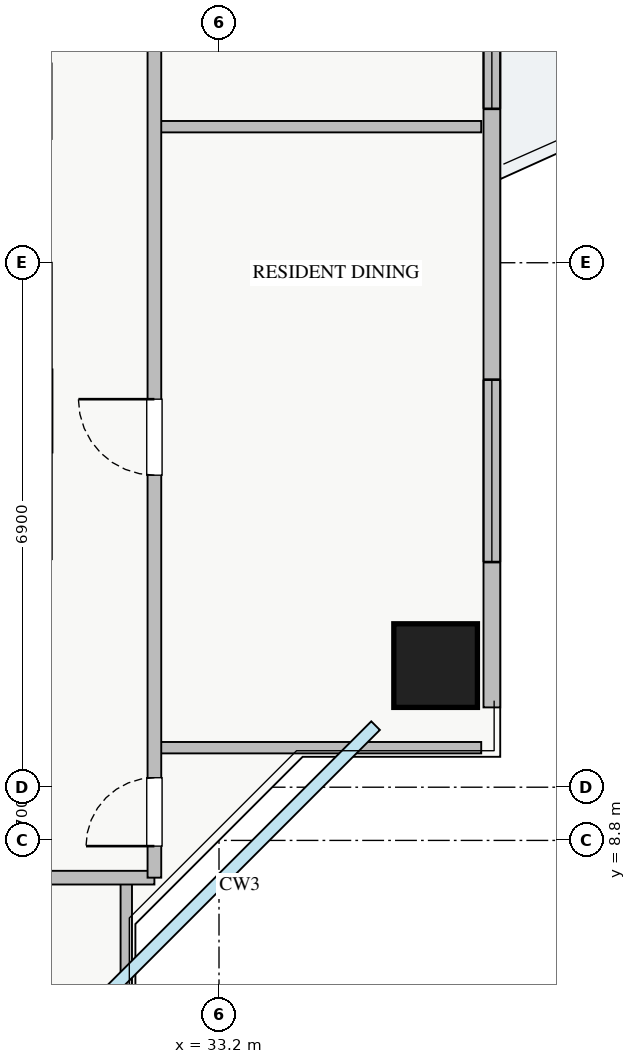
"""IFC4 building model, lengths in metres.
Left out: names, types, materials, properties, quantities, classifications, styles, units other than length and angle.
Written with IfcOpenShell. Run it as: python <this file> out.ifc"""

import sys

from ifc_helpers import new_model, si_unit, direction, frame, frame_2d, origin, origin_2d, place, context, subcontext, project, spatial, rectangle, extrude, source, transform, mapped, element, fill, save


model = new_model("IFC4")
c1 = context("Model", 3, precision=1e-05, world=origin(), true_north=direction((0.0, 1.0)))
c2 = subcontext(c1, "Body", "Model", "MODEL_VIEW")
j1 = project(units=[si_unit("LENGTHUNIT", "METRE"), si_unit("PLANEANGLEUNIT", "RADIAN")], contexts=[c1])
p1 = place(None, origin())
s1 = spatial("IfcSite", under=j1, at=p1, CompositionType="ELEMENT")
p2 = place(p1, origin())
s2 = spatial("IfcBuilding", under=s1, at=p2, CompositionType="ELEMENT")
p3 = place(p2, frame((0.0, 0.0, 129.5)))
s3 = spatial("IfcBuildingStorey", under=s2, at=p3, CompositionType="ELEMENT", Elevation=129.5)
m1 = source(origin(), c2, "Body", "SweptSolid", [
    extrude(rectangle(XDim=1.1, YDim=1.1, at=origin_2d()), origin(), (0.0, 0.0, 1.0), 3.25),
])
p4 = place(p3, frame((36.05, 11.1, 0.0), z_axis=(0.0, 0.0, 1.0), x_axis=(1.0, 0.0, 0.0)))
e1 = element("IfcColumn", 1, at=p4, inside=s3, PredefinedType="COLUMN", context=c2, shape_type="MappedRepresentation", body=[
    mapped(m1, transform((0.0, 0.0, 0.0), x_axis=(1.0, 0.0, 0.0), y_axis=(0.0, 1.0, 0.0), z_axis=(0.0, 0.0, 1.0), scale=1.0)),
])
p5 = place(p3, frame((36.79, 10.55, 0.0), z_axis=(0.0, 0.0, 1.0), x_axis=(0.0, 1.0, 0.0)))
e2 = element("IfcWall", 2, at=p5, inside=s3, PredefinedType="STANDARD", context=c2, shape_type="SweptSolid", body=[
    extrude(rectangle(XDim=24.9, YDim=0.22, at=frame_2d((12.45, 0.0))), origin(), (0.0, 0.0, 1.0), 2.61),
])
p6 = place(p5, frame((13.3, 0.0, 0.0)))
e3 = element("IfcOpeningElement", 3, at=p6, cuts=e2, PredefinedType="OPENING", context=c2, shape_type="SweptSolid", body=[
    extrude(rectangle(XDim=1.2, YDim=2.1, at=frame_2d((0.6, 1.05))), frame((0.0, 0.12, 0.0), z_axis=(0.0, -1.0, 0.0), x_axis=(1.0, 0.0, 0.0)), (0.0, 0.0, 1.0), 0.24),
])
p7 = place(p5, frame((1.912, 0.0, 0.9)))
e4 = element("IfcOpeningElement", 4, at=p7, cuts=e2, PredefinedType="OPENING", context=c2, shape_type="SweptSolid", body=[
    extrude(rectangle(XDim=2.4, YDim=1.48, at=frame_2d((1.2, 0.74))), frame((0.0, 0.12, 0.0), z_axis=(0.0, -1.0, 0.0), x_axis=(1.0, 0.0, 0.0)), (0.0, 0.0, 1.0), 0.24),
])
p8 = place(p5, frame((22.165, 0.0, 0.9)))
e5 = element("IfcOpeningElement", 5, at=p8, cuts=e2, PredefinedType="OPENING", context=c2, shape_type="SweptSolid", body=[
    extrude(rectangle(XDim=2.1, YDim=1.5, at=frame_2d((1.05, 0.75))), frame((0.0, 0.12, 0.0), z_axis=(0.0, -1.0, 0.0), x_axis=(1.0, 0.0, 0.0)), (0.0, 0.0, 1.0), 0.24),
])
p9 = place(p5, frame((18.093, 0.0, 0.9)))
e6 = element("IfcOpeningElement", 6, at=p9, cuts=e2, PredefinedType="OPENING", context=c2, shape_type="SweptSolid", body=[
    extrude(rectangle(XDim=2.4, YDim=1.5, at=frame_2d((1.2, 0.75))), frame((0.0, 0.12, 0.0), z_axis=(0.0, -1.0, 0.0), x_axis=(1.0, 0.0, 0.0)), (0.0, 0.0, 1.0), 0.24),
])
p10 = place(p5, frame((7.875, 0.0, 0.9)))
e7 = element("IfcOpeningElement", 7, at=p10, cuts=e2, PredefinedType="OPENING", context=c2, shape_type="SweptSolid", body=[
    extrude(rectangle(XDim=0.9, YDim=1.2, at=frame_2d((0.45, 0.6))), frame((0.0, 0.12, 0.0), z_axis=(0.0, -1.0, 0.0), x_axis=(1.0, 0.0, 0.0)), (0.0, 0.0, 1.0), 0.24),
])
p11 = place(p3, frame((31.98, 5.35, 0.0), z_axis=(0.0, 0.0, 1.0), x_axis=(0.0, 1.0, 0.0)))
e8 = element("IfcWall", 8, at=p11, inside=s3, PredefinedType="PARTITIONING", context=c2, shape_type="SweptSolid", body=[
    extrude(rectangle(XDim=2.96, YDim=0.15, at=frame_2d((1.48, 0.0))), origin(), (0.0, 0.0, 1.0), 3.07),
])
p12 = place(p3, frame((8.72, 8.31, 0.0), z_axis=(0.0, 0.0, 1.0), x_axis=(1.0, 0.0, 0.0)))
e9 = element("IfcWall", 9, at=p12, inside=s3, PredefinedType="PARTITIONING", context=c2, shape_type="SweptSolid", body=[
    extrude(rectangle(XDim=23.63, YDim=0.18, at=frame_2d((11.815, 0.0))), origin(), (0.0, 0.0, 1.0), 3.07),
])
p13 = place(p12, frame((4.69, 0.0, 0.0)))
e10 = element("IfcOpeningElement", 10, at=p13, cuts=e9, PredefinedType="OPENING", context=c2, shape_type="SweptSolid", body=[
    extrude(rectangle(XDim=1.0, YDim=2.05, at=frame_2d((0.5, 1.025))), frame((0.0, 0.1, 0.0), z_axis=(0.0, -1.0, 0.0), x_axis=(1.0, 0.0, 0.0)), (0.0, 0.0, 1.0), 0.2),
])
p14 = place(p12, frame((16.32, 0.0, 0.0)))
e11 = element("IfcOpeningElement", 11, at=p14, cuts=e9, PredefinedType="OPENING", context=c2, shape_type="SweptSolid", body=[
    extrude(rectangle(XDim=1.0, YDim=2.05, at=frame_2d((0.5, 1.025))), frame((0.0, 0.1, 0.0), z_axis=(0.0, -1.0, 0.0), x_axis=(1.0, 0.0, 0.0)), (0.0, 0.0, 1.0), 0.2),
])
p15 = place(p3, frame((32.35, 10.02, 0.0), z_axis=(0.0, 0.0, 1.0), x_axis=(1.0, 0.0, 0.0)))
e12 = element("IfcWall", 12, at=p15, inside=s3, PredefinedType="PARTITIONING", context=c2, shape_type="SweptSolid", body=[
    extrude(rectangle(XDim=4.3, YDim=0.15, at=frame_2d((2.15, 0.0))), origin(), (0.0, 0.0, 1.0), 3.07),
])
p16 = place(p3, frame((32.35, 18.19, 0.0), z_axis=(0.0, 0.0, 1.0), x_axis=(1.0, 0.0, 0.0)))
e13 = element("IfcWall", 13, at=p16, inside=s3, PredefinedType="PARTITIONING", context=c2, shape_type="SweptSolid", body=[
    extrude(rectangle(XDim=4.3, YDim=0.15, at=frame_2d((2.15, 0.0))), origin(), (0.0, 0.0, 1.0), 2.821),
])
p17 = place(p3, frame((32.35, 8.31, 0.0), z_axis=(0.0, 0.0, 1.0), x_axis=(0.0, 1.0, 0.0)))
e14 = element("IfcWall", 14, at=p17, inside=s3, PredefinedType="PARTITIONING", context=c2, shape_type="SweptSolid", body=[
    extrude(rectangle(XDim=29.37, YDim=0.18, at=frame_2d((14.685, 0.0))), origin(), (0.0, 0.0, 1.0), 3.07),
])
p18 = place(p17, frame((28.06, 0.0, 0.0)))
e15 = element("IfcOpeningElement", 15, at=p18, cuts=e14, PredefinedType="OPENING", context=c2, shape_type="SweptSolid", body=[
    extrude(rectangle(XDim=0.9, YDim=2.05, at=frame_2d((0.45, 1.025))), frame((0.0, 0.1, 0.0), z_axis=(0.0, -1.0, 0.0), x_axis=(1.0, 0.0, 0.0)), (0.0, 0.0, 1.0), 0.2),
])
p19 = place(p17, frame((0.415, 0.0, 0.0)))
e16 = element("IfcOpeningElement", 16, at=p19, cuts=e14, PredefinedType="OPENING", context=c2, shape_type="SweptSolid", body=[
    extrude(rectangle(XDim=0.9, YDim=2.05, at=frame_2d((0.45, 1.025))), frame((0.0, 0.1, 0.0), z_axis=(0.0, -1.0, 0.0), x_axis=(1.0, 0.0, 0.0)), (0.0, 0.0, 1.0), 0.2),
])
p20 = place(p17, frame((5.295, 0.0, 0.0)))
e17 = element("IfcOpeningElement", 17, at=p20, cuts=e14, PredefinedType="OPENING", context=c2, shape_type="SweptSolid", body=[
    extrude(rectangle(XDim=1.0, YDim=2.05, at=frame_2d((0.5, 1.025))), frame((0.0, 0.1, 0.0), z_axis=(0.0, -1.0, 0.0), x_axis=(1.0, 0.0, 0.0)), (0.0, 0.0, 1.0), 0.2),
])
p21 = place(p17, frame((11.645, 0.0, 0.0)))
e18 = element("IfcOpeningElement", 18, at=p21, cuts=e14, PredefinedType="OPENING", context=c2, shape_type="SweptSolid", body=[
    extrude(rectangle(XDim=1.0, YDim=2.05, at=frame_2d((0.5, 1.025))), frame((0.0, 0.1, 0.0), z_axis=(0.0, -1.0, 0.0), x_axis=(1.0, 0.0, 0.0)), (0.0, 0.0, 1.0), 0.2),
])
p22 = place(p17, frame((20.835, 0.0, 0.0)))
e19 = element("IfcOpeningElement", 19, at=p22, cuts=e14, PredefinedType="OPENING", context=c2, shape_type="SweptSolid", body=[
    extrude(rectangle(XDim=1.0, YDim=2.05, at=frame_2d((0.5, 1.025))), frame((0.0, 0.1, 0.0), z_axis=(0.0, -1.0, 0.0), x_axis=(1.0, 0.0, 0.0)), (0.0, 0.0, 1.0), 0.2),
])
m2 = source(origin(), c2, "Body", "SweptSolid", [
    extrude(rectangle(XDim=2.4, YDim=1.48, at=frame_2d((1.2, 0.74))), frame((0.0, 0.03, 0.0), z_axis=(0.0, -1.0, 0.0), x_axis=(1.0, 0.0, 0.0)), (0.0, 0.0, 1.0), 0.06),
])
p23 = place(p7, origin())
e20 = element("IfcWindow", 20, at=p23, inside=s3, PartitioningType="TRIPLE_PANEL_VERTICAL", PredefinedType="WINDOW", context=c2, shape_type="MappedRepresentation", body=[
    mapped(m2, transform((0.0, 0.0, 0.0), x_axis=(1.0, 0.0, 0.0), y_axis=(0.0, 1.0, 0.0), z_axis=(0.0, 0.0, 1.0), scale=1.0)),
])
fill(e4, e20)
m3 = source(origin(), c2, "Body", "SweptSolid", [
    extrude(rectangle(XDim=0.9, YDim=2.05, at=frame_2d((0.45, 1.025))), frame((0.0, 0.025, 0.0), z_axis=(0.0, -1.0, 0.0), x_axis=(1.0, 0.0, 0.0)), (0.0, 0.0, 1.0), 0.05),
])
p24 = place(p19, origin())
e21 = element("IfcDoor", 21, at=p24, inside=s3, OperationType="SINGLE_SWING_LEFT", PredefinedType="DOOR", context=c2, shape_type="MappedRepresentation", body=[
    mapped(m3, transform((0.0, 0.0, 0.0), x_axis=(1.0, 0.0, 0.0), y_axis=(0.0, 1.0, 0.0), z_axis=(0.0, 0.0, 1.0), scale=1.0)),
])
fill(e16, e21)
m4 = source(origin(), c2, "Body", "SweptSolid", [
    extrude(rectangle(XDim=1.0, YDim=2.05, at=frame_2d((0.5, 1.025))), frame((0.0, 0.025, 0.0), z_axis=(0.0, -1.0, 0.0), x_axis=(1.0, 0.0, 0.0)), (0.0, 0.0, 1.0), 0.05),
])
p25 = place(p20, origin())
e22 = element("IfcDoor", 22, at=p25, inside=s3, OperationType="SINGLE_SWING_RIGHT", PredefinedType="DOOR", context=c2, shape_type="MappedRepresentation", body=[
    mapped(m4, transform((0.0, 0.0, 0.0), x_axis=(1.0, 0.0, 0.0), y_axis=(0.0, 1.0, 0.0), z_axis=(0.0, 0.0, 1.0), scale=1.0)),
])
fill(e17, e22)
m5 = source(origin(), c2, "Body", "SweptSolid", [
    extrude(rectangle(XDim=0.9, YDim=1.2, at=frame_2d((0.45, 0.6))), frame((0.0, 0.03, 0.0), z_axis=(0.0, -1.0, 0.0), x_axis=(1.0, 0.0, 0.0)), (0.0, 0.0, 1.0), 0.06),
])
p26 = place(p10, origin())
e23 = element("IfcWindow", 23, at=p26, inside=s3, PartitioningType="SINGLE_PANEL", PredefinedType="WINDOW", context=c2, shape_type="MappedRepresentation", body=[
    mapped(m5, transform((0.0, 0.0, 0.0), x_axis=(1.0, 0.0, 0.0), y_axis=(0.0, 1.0, 0.0), z_axis=(0.0, 0.0, 1.0), scale=1.0)),
])
fill(e7, e23)
save(model, sys.argv[1])
